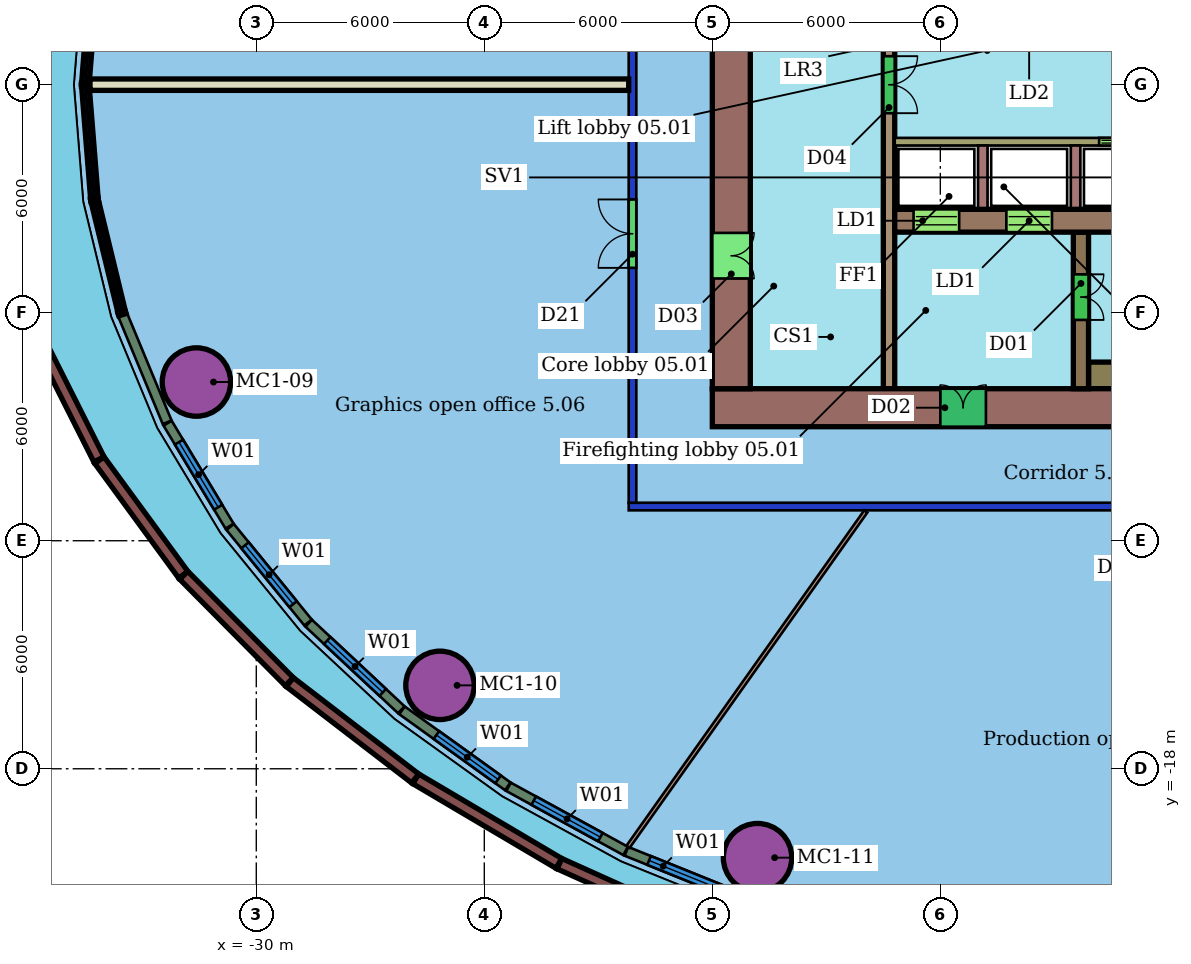
"""IFC4 building model, lengths in metres.
Left out: names, types, materials, properties, quantities, classifications, styles, units other than length and angle.
Written with IfcOpenShell. Run it as: python <this file> out.ifc"""

import sys

from ifc_helpers import new_model, si_unit, direction, frame, frame_2d, origin, origin_2d, place, context, subcontext, project, spatial, rectangle, hollow_circle, extrude, element, fill, save


model = new_model("IFC4")
c1 = context("Model", 3, precision=1e-05, world=origin(), true_north=direction((0.0, 1.0)))
c2 = subcontext(c1, "Body", "Model", "MODEL_VIEW")
j1 = project(units=[si_unit("LENGTHUNIT", "METRE"), si_unit("PLANEANGLEUNIT", "RADIAN")], contexts=[c1])
p1 = place(None, origin())
s1 = spatial("IfcSite", under=j1, at=p1, CompositionType="ELEMENT")
p2 = place(p1, origin())
s2 = spatial("IfcBuilding", under=s1, at=p2, CompositionType="ELEMENT")
p3 = place(p2, frame((0.0, 0.0, 36.0)))
s3 = spatial("IfcBuildingStorey", under=s2, at=p3, CompositionType="ELEMENT", Elevation=36.0)
for number, where, z_axis, x_axis in (
    (1, (-31.575, -7.824, 0.0), (0.0, 0.0, 1.0), (1.0, 0.0, 0.0)),
    (2, (-25.166, -15.805, 0.0), (0.0, 0.0, 1.0), (1.0, 0.0, 0.0)),
    (3, (-16.81, -20.339, 0.0), (0.0, 0.0, 1.0), (1.0, 0.0, 0.0)),
):
    element("IfcColumn", number, at=place(p3, frame(where, z_axis=z_axis, x_axis=x_axis)), inside=s3, PredefinedType="COLUMN", context=c2, shape_type="SweptSolid", body=[
        extrude(hollow_circle(Radius=0.9, WallThickness=0.06, at=origin_2d()), origin(), (0.0, 0.0, 1.0), 3.55),
    ])
p4 = place(p3, frame((8.2, -11.1, 0.0), z_axis=(0.0, 0.0, 1.0), x_axis=(-1.0, 0.0, 0.0)))
e4 = element("IfcWall", 4, at=p4, inside=s3, PredefinedType="PARTITIONING", context=c2, shape_type="SweptSolid", body=[
    extrude(rectangle(XDim=28.4, YDim=0.2, at=frame_2d((14.2, 0.0))), origin(), (0.0, 0.0, 1.0), 2.85),
])
p5 = place(p4, frame((12.215, 0.0, 0.0)))
e5 = element("IfcOpeningElement", 5, at=p5, cuts=e4, PredefinedType="OPENING", context=c2, shape_type="SweptSolid", body=[
    extrude(rectangle(XDim=1.8, YDim=2.1, at=frame_2d((0.9, 1.05))), frame((0.0, 0.11, 0.0), z_axis=(0.0, -1.0, 0.0), x_axis=(1.0, 0.0, 0.0)), (0.0, 0.0, 1.0), 0.22),
])
p6 = place(p4, frame((4.522, 0.0, 0.0)))
e6 = element("IfcOpeningElement", 6, at=p6, cuts=e4, PredefinedType="OPENING", context=c2, shape_type="SweptSolid", body=[
    extrude(rectangle(XDim=1.8, YDim=2.1, at=frame_2d((0.9, 1.05))), frame((0.0, 0.11, 0.0), z_axis=(0.0, -1.0, 0.0), x_axis=(1.0, 0.0, 0.0)), (0.0, 0.0, 1.0), 0.22),
])
p7 = place(p3, frame((-20.1, -11.0, 0.0), z_axis=(0.0, 0.0, 1.0), x_axis=(0.0, 1.0, 0.0)))
e7 = element("IfcWall", 7, at=p7, inside=s3, PredefinedType="PARTITIONING", context=c2, shape_type="SweptSolid", body=[
    extrude(rectangle(XDim=22.0, YDim=0.2, at=frame_2d((11.0, 0.0))), origin(), (0.0, 0.0, 1.0), 2.85),
])
p8 = place(p7, frame((13.38, 0.0, 0.0)))
e8 = element("IfcOpeningElement", 8, at=p8, cuts=e7, PredefinedType="OPENING", context=c2, shape_type="SweptSolid", body=[
    extrude(rectangle(XDim=1.1, YDim=2.1, at=frame_2d((0.55, 1.05))), frame((0.0, 0.11, 0.0), z_axis=(0.0, -1.0, 0.0), x_axis=(1.0, 0.0, 0.0)), (0.0, 0.0, 1.0), 0.22),
])
p9 = place(p7, frame((6.18, 0.0, 0.0)))
e9 = element("IfcOpeningElement", 9, at=p9, cuts=e7, PredefinedType="OPENING", context=c2, shape_type="SweptSolid", body=[
    extrude(rectangle(XDim=1.8, YDim=2.1, at=frame_2d((0.9, 1.05))), frame((0.0, 0.11, 0.0), z_axis=(0.0, -1.0, 0.0), x_axis=(1.0, 0.0, 0.0)), (0.0, 0.0, 1.0), 0.22),
])
p10 = place(p3, frame((-34.375, 0.0, 0.0), z_axis=(0.0, 0.0, 1.0), x_axis=(1.0, 0.0, 0.0)))
e10 = element("IfcWall", 10, at=p10, inside=s3, PredefinedType="PARTITIONING", context=c2, shape_type="SweptSolid", body=[
    extrude(rectangle(XDim=14.175, YDim=0.3, at=frame_2d((7.087, 0.0))), origin(), (0.0, 0.0, 1.0), 3.55),
])
p11 = place(p3, frame((-20.218, -20.054, 0.0), z_axis=(0.0, 0.0, 1.0), x_axis=(0.578391097438, 0.815759608221, 0.0)))
e11 = element("IfcWall", 11, at=p11, inside=s3, PredefinedType="PARTITIONING", context=c2, shape_type="SweptSolid", body=[
    extrude(rectangle(XDim=10.818, YDim=0.1, at=frame_2d((5.409, 0.0))), origin(), (0.0, 0.0, 1.0), 3.55),
])
p12 = place(p3, frame((-33.512, -6.066, 0.0), z_axis=(0.0, 0.0, 1.0), x_axis=(0.382665181283, -0.923887092146, 0.0)))
e12 = element("IfcWall", 12, at=p12, inside=s3, PredefinedType="SOLIDWALL", context=c2, shape_type="SweptSolid", body=[
    extrude(rectangle(XDim=3.05, YDim=0.25, at=frame_2d((1.525, 0.0))), origin(), (0.0, 0.0, 1.0), 3.15),
])
p13 = place(p3, frame((-32.333, -8.907, 0.0), z_axis=(0.0, 0.0, 1.0), x_axis=(0.51563096518, -0.856810777096, 0.0)))
e13 = element("IfcWall", 13, at=p13, inside=s3, PredefinedType="SOLIDWALL", context=c2, shape_type="SweptSolid", body=[
    extrude(rectangle(XDim=3.161, YDim=0.25, at=frame_2d((1.581, 0.0))), origin(), (0.0, 0.0, 1.0), 3.15),
])
p14 = place(p13, frame((0.581, 0.0, 0.8)))
e14 = element("IfcOpeningElement", 14, at=p14, cuts=e13, PredefinedType="OPENING", context=c2, shape_type="SweptSolid", body=[
    extrude(rectangle(XDim=2.0, YDim=2.2, at=frame_2d((1.0, 1.1))), frame((0.0, 0.135, 0.0), z_axis=(0.0, -1.0, 0.0), x_axis=(1.0, 0.0, 0.0)), (0.0, 0.0, 1.0), 0.27),
])
p15 = place(p3, frame((-30.688, -11.637, 0.0), z_axis=(0.0, 0.0, 1.0), x_axis=(0.631970989947, -0.774992043743, 0.0)))
e15 = element("IfcWall", 15, at=p15, inside=s3, PredefinedType="SOLIDWALL", context=c2, shape_type="SweptSolid", body=[
    extrude(rectangle(XDim=3.245, YDim=0.25, at=frame_2d((1.623, 0.0))), origin(), (0.0, 0.0, 1.0), 3.15),
])
p16 = place(p15, frame((0.623, 0.0, 0.8)))
e16 = element("IfcOpeningElement", 16, at=p16, cuts=e15, PredefinedType="OPENING", context=c2, shape_type="SweptSolid", body=[
    extrude(rectangle(XDim=2.0, YDim=2.2, at=frame_2d((1.0, 1.1))), frame((0.0, 0.135, 0.0), z_axis=(0.0, -1.0, 0.0), x_axis=(1.0, 0.0, 0.0)), (0.0, 0.0, 1.0), 0.27),
])
p17 = place(p3, frame((-28.621, -14.17, 0.0), z_axis=(0.0, 0.0, 1.0), x_axis=(0.730670592597, -0.682730170063, 0.0)))
e17 = element("IfcWall", 17, at=p17, inside=s3, PredefinedType="SOLIDWALL", context=c2, shape_type="SweptSolid", body=[
    extrude(rectangle(XDim=3.336, YDim=0.25, at=frame_2d((1.668, 0.0))), origin(), (0.0, 0.0, 1.0), 3.15),
])
p18 = place(p17, frame((0.668, 0.0, 0.8)))
e18 = element("IfcOpeningElement", 18, at=p18, cuts=e17, PredefinedType="OPENING", context=c2, shape_type="SweptSolid", body=[
    extrude(rectangle(XDim=2.0, YDim=2.2, at=frame_2d((1.0, 1.1))), frame((0.0, 0.135, 0.0), z_axis=(0.0, -1.0, 0.0), x_axis=(1.0, 0.0, 0.0)), (0.0, 0.0, 1.0), 0.27),
])
p19 = place(p3, frame((-26.165, -16.463, 0.0), z_axis=(0.0, 0.0, 1.0), x_axis=(0.812059685452, -0.5835743888, 0.0)))
e19 = element("IfcWall", 19, at=p19, inside=s3, PredefinedType="SOLIDWALL", context=c2, shape_type="SweptSolid", body=[
    extrude(rectangle(XDim=3.427, YDim=0.25, at=frame_2d((1.713, 0.0))), origin(), (0.0, 0.0, 1.0), 3.15),
])
p20 = place(p19, frame((1.113, 0.0, 0.8)))
e20 = element("IfcOpeningElement", 20, at=p20, cuts=e19, PredefinedType="OPENING", context=c2, shape_type="SweptSolid", body=[
    extrude(rectangle(XDim=2.0, YDim=2.2, at=frame_2d((1.0, 1.1))), frame((0.0, 0.135, 0.0), z_axis=(0.0, -1.0, 0.0), x_axis=(1.0, 0.0, 0.0)), (0.0, 0.0, 1.0), 0.27),
])
p21 = place(p3, frame((-23.362, -18.475, 0.0), z_axis=(0.0, 0.0, 1.0), x_axis=(0.8771213679, -0.480268785134, 0.0)))
e21 = element("IfcWall", 21, at=p21, inside=s3, PredefinedType="SOLIDWALL", context=c2, shape_type="SweptSolid", body=[
    extrude(rectangle(XDim=3.512, YDim=0.25, at=frame_2d((1.756, 0.0))), origin(), (0.0, 0.0, 1.0), 3.15),
])
p22 = place(p21, frame((0.756, 0.0, 0.8)))
e22 = element("IfcOpeningElement", 22, at=p22, cuts=e21, PredefinedType="OPENING", context=c2, shape_type="SweptSolid", body=[
    extrude(rectangle(XDim=2.0, YDim=2.2, at=frame_2d((1.0, 1.1))), frame((0.0, 0.135, 0.0), z_axis=(0.0, -1.0, 0.0), x_axis=(1.0, 0.0, 0.0)), (0.0, 0.0, 1.0), 0.27),
])
p23 = place(p3, frame((-20.261, -20.171, 0.0), z_axis=(0.0, 0.0, 1.0), x_axis=(0.927147291409, -0.374697077694, 0.0)))
e23 = element("IfcWall", 23, at=p23, inside=s3, PredefinedType="SOLIDWALL", context=c2, shape_type="SweptSolid", body=[
    extrude(rectangle(XDim=3.588, YDim=0.25, at=frame_2d((1.794, 0.0))), origin(), (0.0, 0.0, 1.0), 3.15),
])
p24 = place(p23, frame((0.644, 0.0, 0.8)))
e24 = element("IfcOpeningElement", 24, at=p24, cuts=e23, PredefinedType="OPENING", context=c2, shape_type="SweptSolid", body=[
    extrude(rectangle(XDim=2.0, YDim=2.2, at=frame_2d((1.0, 1.1))), frame((0.0, 0.135, 0.0), z_axis=(0.0, -1.0, 0.0), x_axis=(1.0, 0.0, 0.0)), (0.0, 0.0, 1.0), 0.27),
])
p25 = place(p3, frame((-35.74, -6.686, 0.0), z_axis=(0.0, 0.0, 1.0), x_axis=(0.450095618006, -0.892980366331, 0.0)))
e25 = element("IfcWall", 25, at=p25, inside=s3, PredefinedType="PARAPET", context=c2, shape_type="SweptSolid", body=[
    extrude(rectangle(XDim=3.555, YDim=0.3, at=frame_2d((1.777, 0.0))), origin(), (0.0, 0.0, 1.0), 1.1),
])
p26 = place(p3, frame((-34.128, -9.881, 0.0), z_axis=(0.0, 0.0, 1.0), x_axis=(0.590742651478, -0.806860037258, 0.0)))
e26 = element("IfcWall", 26, at=p26, inside=s3, PredefinedType="PARAPET", context=c2, shape_type="SweptSolid", body=[
    extrude(rectangle(XDim=3.734, YDim=0.3, at=frame_2d((1.867, 0.0))), origin(), (0.0, 0.0, 1.0), 1.1),
])
p27 = place(p3, frame((-31.908, -12.91, 0.0), z_axis=(0.0, 0.0, 1.0), x_axis=(0.704282546554, -0.709919780412, 0.0)))
e27 = element("IfcWall", 27, at=p27, inside=s3, PredefinedType="PARAPET", context=c2, shape_type="SweptSolid", body=[
    extrude(rectangle(XDim=3.941, YDim=0.3, at=frame_2d((1.971, 0.0))), origin(), (0.0, 0.0, 1.0), 1.1),
])
p28 = place(p3, frame((-29.117, -15.721, 0.0), z_axis=(0.0, 0.0, 1.0), x_axis=(0.793088450724, -0.609106484392, 0.0)))
e28 = element("IfcWall", 28, at=p28, inside=s3, PredefinedType="PARAPET", context=c2, shape_type="SweptSolid", body=[
    extrude(rectangle(XDim=4.16, YDim=0.3, at=frame_2d((2.08, 0.0))), origin(), (0.0, 0.0, 1.0), 1.1),
])
p29 = place(p3, frame((-25.803, -18.265, 0.0), z_axis=(0.0, 0.0, 1.0), x_axis=(0.861027611146, -0.508558209888, 0.0)))
e29 = element("IfcWall", 29, at=p29, inside=s3, PredefinedType="PARAPET", context=c2, shape_type="SweptSolid", body=[
    extrude(rectangle(XDim=4.375, YDim=0.3, at=frame_2d((2.188, 0.0))), origin(), (0.0, 0.0, 1.0), 1.1),
])
p30 = place(p3, frame((-22.022, -20.498, 0.0), z_axis=(0.0, 0.0, 1.0), x_axis=(0.911912513487, -0.410384658274, 0.0)))
e30 = element("IfcWall", 30, at=p30, inside=s3, PredefinedType="PARAPET", context=c2, shape_type="SweptSolid", body=[
    extrude(rectangle(XDim=4.573, YDim=0.3, at=frame_2d((2.286, 0.0))), origin(), (0.0, 0.0, 1.0), 1.1),
])
p31 = place(p3, frame((-18.0, -8.5, 0.0), z_axis=(0.0, 0.0, 1.0), x_axis=(1.0, 0.0, 0.0)))
e31 = element("IfcWall", 31, at=p31, inside=s3, PredefinedType="SHEAR", context=c2, shape_type="SweptSolid", body=[
    extrude(rectangle(XDim=24.0, YDim=1.0, at=frame_2d((12.0, 0.0))), origin(), (0.0, 0.0, 1.0), 3.4),
])
p32 = place(p31, frame((6.0, 0.0, 0.0)))
e32 = element("IfcOpeningElement", 32, at=p32, cuts=e31, PredefinedType="OPENING", context=c2, shape_type="SweptSolid", body=[
    extrude(rectangle(XDim=1.2, YDim=2.1, at=frame_2d((0.6, 1.05))), frame((0.0, 0.51, 0.0), z_axis=(0.0, -1.0, 0.0), x_axis=(1.0, 0.0, 0.0)), (0.0, 0.0, 1.0), 1.02),
])
p33 = place(p3, frame((-17.5, 8.0, 0.0), z_axis=(0.0, 0.0, 1.0), x_axis=(0.0, -1.0, 0.0)))
e33 = element("IfcWall", 33, at=p33, inside=s3, PredefinedType="SHEAR", context=c2, shape_type="SweptSolid", body=[
    extrude(rectangle(XDim=16.0, YDim=1.0, at=frame_2d((8.0, 0.0))), origin(), (0.0, 0.0, 1.0), 3.4),
])
p34 = place(p33, frame((11.9, 0.0, 0.0)))
e34 = element("IfcOpeningElement", 34, at=p34, cuts=e33, PredefinedType="OPENING", context=c2, shape_type="SweptSolid", body=[
    extrude(rectangle(XDim=1.2, YDim=2.1, at=frame_2d((0.6, 1.05))), frame((0.0, 0.51, 0.0), z_axis=(0.0, -1.0, 0.0), x_axis=(1.0, 0.0, 0.0)), (0.0, 0.0, 1.0), 1.02),
])
p35 = place(p33, frame((2.9, 0.0, 0.0)))
e35 = element("IfcOpeningElement", 35, at=p35, cuts=e33, PredefinedType="OPENING", context=c2, shape_type="SweptSolid", body=[
    extrude(rectangle(XDim=1.2, YDim=2.1, at=frame_2d((0.6, 1.05))), frame((0.0, 0.51, 0.0), z_axis=(0.0, -1.0, 0.0), x_axis=(1.0, 0.0, 0.0)), (0.0, 0.0, 1.0), 1.02),
])
p36 = place(p3, frame((-13.2, -3.58, 0.0), z_axis=(0.0, 0.0, 1.0), x_axis=(1.0, 0.0, 0.0)))
e36 = element("IfcWall", 36, at=p36, inside=s3, PredefinedType="SHEAR", context=c2, shape_type="SweptSolid", body=[
    extrude(rectangle(XDim=7.2, YDim=0.6, at=frame_2d((3.6, 0.0))), origin(), (0.0, 0.0, 1.0), 3.4),
])
p37 = place(p36, frame((0.496, 0.0, 0.0)))
e37 = element("IfcOpeningElement", 37, at=p37, cuts=e36, PredefinedType="OPENING", context=c2, shape_type="SweptSolid", body=[
    extrude(rectangle(XDim=1.2, YDim=2.1, at=frame_2d((0.6, 1.05))), frame((0.0, 0.31, 0.0), z_axis=(0.0, -1.0, 0.0), x_axis=(1.0, 0.0, 0.0)), (0.0, 0.0, 1.0), 0.62),
])
p38 = place(p36, frame((2.938, 0.0, 0.0)))
e38 = element("IfcOpeningElement", 38, at=p38, cuts=e36, PredefinedType="OPENING", context=c2, shape_type="SweptSolid", body=[
    extrude(rectangle(XDim=1.2, YDim=2.1, at=frame_2d((0.6, 1.05))), frame((0.0, 0.31, 0.0), z_axis=(0.0, -1.0, 0.0), x_axis=(1.0, 0.0, 0.0)), (0.0, 0.0, 1.0), 0.62),
])
p39 = place(p3, frame((-13.35, 8.0, 0.0), z_axis=(0.0, 0.0, 1.0), x_axis=(0.0, -1.0, 0.0)))
e39 = element("IfcWall", 39, at=p39, inside=s3, PredefinedType="SHEAR", context=c2, shape_type="SweptSolid", body=[
    extrude(rectangle(XDim=16.0, YDim=0.3, at=frame_2d((8.0, 0.0))), origin(), (0.0, 0.0, 1.0), 3.4),
])
p40 = place(p39, frame((7.25, 0.0, 0.0)))
e40 = element("IfcOpeningElement", 40, at=p40, cuts=e39, PredefinedType="OPENING", context=c2, shape_type="SweptSolid", body=[
    extrude(rectangle(XDim=1.5, YDim=2.1, at=frame_2d((0.75, 1.05))), frame((0.0, 0.16, 0.0), z_axis=(0.0, -1.0, 0.0), x_axis=(1.0, 0.0, 0.0)), (0.0, 0.0, 1.0), 0.32),
])
p41 = place(p3, frame((1.2, -1.5, 0.0), z_axis=(0.0, 0.0, 1.0), x_axis=(-1.0, 0.0, 0.0)))
e41 = element("IfcWall", 41, at=p41, inside=s3, PredefinedType="SHEAR", context=c2, shape_type="SweptSolid", body=[
    extrude(rectangle(XDim=14.4, YDim=0.2, at=frame_2d((7.2, 0.0))), origin(), (0.0, 0.0, 1.0), 3.4),
])
p42 = place(p41, frame((7.821, 0.0, 0.0)))
e42 = element("IfcOpeningElement", 42, at=p42, cuts=e41, PredefinedType="OPENING", context=c2, shape_type="SweptSolid", body=[
    extrude(rectangle(XDim=1.2, YDim=2.1, at=frame_2d((0.6, 1.05))), frame((0.0, 0.11, 0.0), z_axis=(0.0, -1.0, 0.0), x_axis=(1.0, 0.0, 0.0)), (0.0, 0.0, 1.0), 0.22),
])
p43 = place(p41, frame((0.15, 0.0, 0.0)))
e43 = element("IfcOpeningElement", 43, at=p43, cuts=e41, PredefinedType="OPENING", context=c2, shape_type="SweptSolid", body=[
    extrude(rectangle(XDim=0.9, YDim=2.1, at=frame_2d((0.45, 1.05))), frame((0.0, 0.11, 0.0), z_axis=(0.0, -1.0, 0.0), x_axis=(1.0, 0.0, 0.0)), (0.0, 0.0, 1.0), 0.22),
])
p44 = place(p3, frame((-8.3, -3.88, 0.0), z_axis=(0.0, 0.0, 1.0), x_axis=(0.0, -1.0, 0.0)))
e44 = element("IfcWall", 44, at=p44, inside=s3, PredefinedType="SHEAR", context=c2, shape_type="SweptSolid", body=[
    extrude(rectangle(XDim=4.12, YDim=0.4, at=frame_2d((2.06, 0.0))), origin(), (0.0, 0.0, 1.0), 3.4),
])
p45 = place(p44, frame((1.11, 0.0, 0.0)))
e45 = element("IfcOpeningElement", 45, at=p45, cuts=e44, PredefinedType="OPENING", context=c2, shape_type="SweptSolid", body=[
    extrude(rectangle(XDim=1.2, YDim=2.1, at=frame_2d((0.6, 1.05))), frame((0.0, 0.21, 0.0), z_axis=(0.0, -1.0, 0.0), x_axis=(1.0, 0.0, 0.0)), (0.0, 0.0, 1.0), 0.42),
])
p46 = place(p3, frame((-8.1, -7.65, 0.0), z_axis=(0.0, 0.0, 1.0), x_axis=(1.0, 0.0, 0.0)))
e46 = element("IfcWall", 46, at=p46, inside=s3, PredefinedType="SHEAR", context=c2, shape_type="SweptSolid", body=[
    extrude(rectangle(XDim=7.05, YDim=0.7, at=frame_2d((3.525, 0.0))), origin(), (0.0, 0.0, 1.0), 3.4),
])
for number, where, z_axis, x_axis in (
    (47, (-10.883, -1.6, 0.0), (0.0, 0.0, 1.0), (0.0, -1.0, 0.0)),
    (48, (-8.442, -1.6, 0.0), (0.0, 0.0, 1.0), (0.0, -1.0, 0.0)),
):
    element("IfcWall", number, at=place(p3, frame(where, z_axis=z_axis, x_axis=x_axis)), inside=s3, PredefinedType="SHEAR", context=c2, shape_type="SweptSolid", body=[
        extrude(rectangle(XDim=1.68, YDim=0.25, at=frame_2d((0.84, 0.0))), origin(), (0.0, 0.0, 1.0), 3.4),
    ])
p47 = place(p9, origin())
e49 = element("IfcDoor", 49, at=p47, inside=s3, OperationType="DOUBLE_DOOR_SINGLE_SWING", PredefinedType="DOOR", context=c2, shape_type="SweptSolid", body=[
    extrude(rectangle(XDim=1.8, YDim=2.1, at=frame_2d((0.9, 1.05))), frame((0.0, 0.025, 0.0), z_axis=(0.0, -1.0, 0.0), x_axis=(1.0, 0.0, 0.0)), (0.0, 0.0, 1.0), 0.05),
])
fill(e9, e49)
p48 = place(p14, origin())
e50 = element("IfcWindow", 50, at=p48, inside=s3, PartitioningType="SINGLE_PANEL", PredefinedType="WINDOW", context=c2, shape_type="SweptSolid", body=[
    extrude(rectangle(XDim=2.0, YDim=2.2, at=frame_2d((1.0, 1.1))), frame((0.0, 0.03, 0.0), z_axis=(0.0, -1.0, 0.0), x_axis=(1.0, 0.0, 0.0)), (0.0, 0.0, 1.0), 0.06),
])
fill(e14, e50)
p49 = place(p16, origin())
e51 = element("IfcWindow", 51, at=p49, inside=s3, PartitioningType="SINGLE_PANEL", PredefinedType="WINDOW", context=c2, shape_type="SweptSolid", body=[
    extrude(rectangle(XDim=2.0, YDim=2.2, at=frame_2d((1.0, 1.1))), frame((0.0, 0.03, 0.0), z_axis=(0.0, -1.0, 0.0), x_axis=(1.0, 0.0, 0.0)), (0.0, 0.0, 1.0), 0.06),
])
fill(e16, e51)
p50 = place(p18, origin())
e52 = element("IfcWindow", 52, at=p50, inside=s3, PartitioningType="SINGLE_PANEL", PredefinedType="WINDOW", context=c2, shape_type="SweptSolid", body=[
    extrude(rectangle(XDim=2.0, YDim=2.2, at=frame_2d((1.0, 1.1))), frame((0.0, 0.03, 0.0), z_axis=(0.0, -1.0, 0.0), x_axis=(1.0, 0.0, 0.0)), (0.0, 0.0, 1.0), 0.06),
])
fill(e18, e52)
p51 = place(p20, origin())
e53 = element("IfcWindow", 53, at=p51, inside=s3, PartitioningType="SINGLE_PANEL", PredefinedType="WINDOW", context=c2, shape_type="SweptSolid", body=[
    extrude(rectangle(XDim=2.0, YDim=2.2, at=frame_2d((1.0, 1.1))), frame((0.0, 0.03, 0.0), z_axis=(0.0, -1.0, 0.0), x_axis=(1.0, 0.0, 0.0)), (0.0, 0.0, 1.0), 0.06),
])
fill(e20, e53)
p52 = place(p22, origin())
e54 = element("IfcWindow", 54, at=p52, inside=s3, PartitioningType="SINGLE_PANEL", PredefinedType="WINDOW", context=c2, shape_type="SweptSolid", body=[
    extrude(rectangle(XDim=2.0, YDim=2.2, at=frame_2d((1.0, 1.1))), frame((0.0, 0.03, 0.0), z_axis=(0.0, -1.0, 0.0), x_axis=(1.0, 0.0, 0.0)), (0.0, 0.0, 1.0), 0.06),
])
fill(e22, e54)
p53 = place(p24, origin())
e55 = element("IfcWindow", 55, at=p53, inside=s3, PartitioningType="SINGLE_PANEL", PredefinedType="WINDOW", context=c2, shape_type="SweptSolid", body=[
    extrude(rectangle(XDim=2.0, YDim=2.2, at=frame_2d((1.0, 1.1))), frame((0.0, 0.03, 0.0), z_axis=(0.0, -1.0, 0.0), x_axis=(1.0, 0.0, 0.0)), (0.0, 0.0, 1.0), 0.06),
])
fill(e24, e55)
p54 = place(p32, origin())
e56 = element("IfcDoor", 56, at=p54, inside=s3, OperationType="DOUBLE_DOOR_SINGLE_SWING", PredefinedType="NOTDEFINED", context=c2, shape_type="SweptSolid", body=[
    extrude(rectangle(XDim=1.2, YDim=2.1, at=frame_2d((0.6, 1.05))), frame((0.0, 0.025, 0.0), z_axis=(0.0, -1.0, 0.0), x_axis=(1.0, 0.0, 0.0)), (0.0, 0.0, 1.0), 0.05),
])
fill(e32, e56)
p55 = place(p34, origin())
e57 = element("IfcDoor", 57, at=p55, inside=s3, OperationType="DOUBLE_DOOR_SINGLE_SWING", PredefinedType="NOTDEFINED", context=c2, shape_type="SweptSolid", body=[
    extrude(rectangle(XDim=1.2, YDim=2.1, at=frame_2d((0.6, 1.05))), frame((0.0, 0.025, 0.0), z_axis=(0.0, -1.0, 0.0), x_axis=(1.0, 0.0, 0.0)), (0.0, 0.0, 1.0), 0.05),
])
fill(e34, e57)
p56 = place(p37, origin())
e58 = element("IfcDoor", 58, at=p56, inside=s3, OperationType="DOUBLE_DOOR_SLIDING", PredefinedType="NOTDEFINED", context=c2, shape_type="SweptSolid", body=[
    extrude(rectangle(XDim=1.2, YDim=2.1, at=frame_2d((0.6, 1.05))), frame((0.0, 0.025, 0.0), z_axis=(0.0, -1.0, 0.0), x_axis=(1.0, 0.0, 0.0)), (0.0, 0.0, 1.0), 0.05),
])
fill(e37, e58)
p57 = place(p38, origin())
e59 = element("IfcDoor", 59, at=p57, inside=s3, OperationType="DOUBLE_DOOR_SLIDING", PredefinedType="NOTDEFINED", context=c2, shape_type="SweptSolid", body=[
    extrude(rectangle(XDim=1.2, YDim=2.1, at=frame_2d((0.6, 1.05))), frame((0.0, 0.025, 0.0), z_axis=(0.0, -1.0, 0.0), x_axis=(1.0, 0.0, 0.0)), (0.0, 0.0, 1.0), 0.05),
])
fill(e38, e59)
p58 = place(p40, origin())
e60 = element("IfcDoor", 60, at=p58, inside=s3, OperationType="DOUBLE_DOOR_SINGLE_SWING", PredefinedType="NOTDEFINED", context=c2, shape_type="SweptSolid", body=[
    extrude(rectangle(XDim=1.5, YDim=2.1, at=frame_2d((0.75, 1.05))), frame((0.0, 0.025, 0.0), z_axis=(0.0, -1.0, 0.0), x_axis=(1.0, 0.0, 0.0)), (0.0, 0.0, 1.0), 0.05),
])
fill(e40, e60)
p59 = place(p42, origin())
e61 = element("IfcDoor", 61, at=p59, inside=s3, OperationType="DOUBLE_DOOR_SLIDING", PredefinedType="NOTDEFINED", context=c2, shape_type="SweptSolid", body=[
    extrude(rectangle(XDim=1.2, YDim=2.1, at=frame_2d((0.6, 1.05))), frame((0.0, 0.025, 0.0), z_axis=(0.0, -1.0, 0.0), x_axis=(1.0, 0.0, 0.0)), (0.0, 0.0, 1.0), 0.05),
])
fill(e42, e61)
p60 = place(p45, origin())
e62 = element("IfcDoor", 62, at=p60, inside=s3, OperationType="DOUBLE_DOOR_SINGLE_SWING", PredefinedType="NOTDEFINED", context=c2, shape_type="SweptSolid", body=[
    extrude(rectangle(XDim=1.2, YDim=2.1, at=frame_2d((0.6, 1.05))), frame((0.0, 0.025, 0.0), z_axis=(0.0, -1.0, 0.0), x_axis=(1.0, 0.0, 0.0)), (0.0, 0.0, 1.0), 0.05),
])
fill(e45, e62)
save(model, sys.argv[1])
